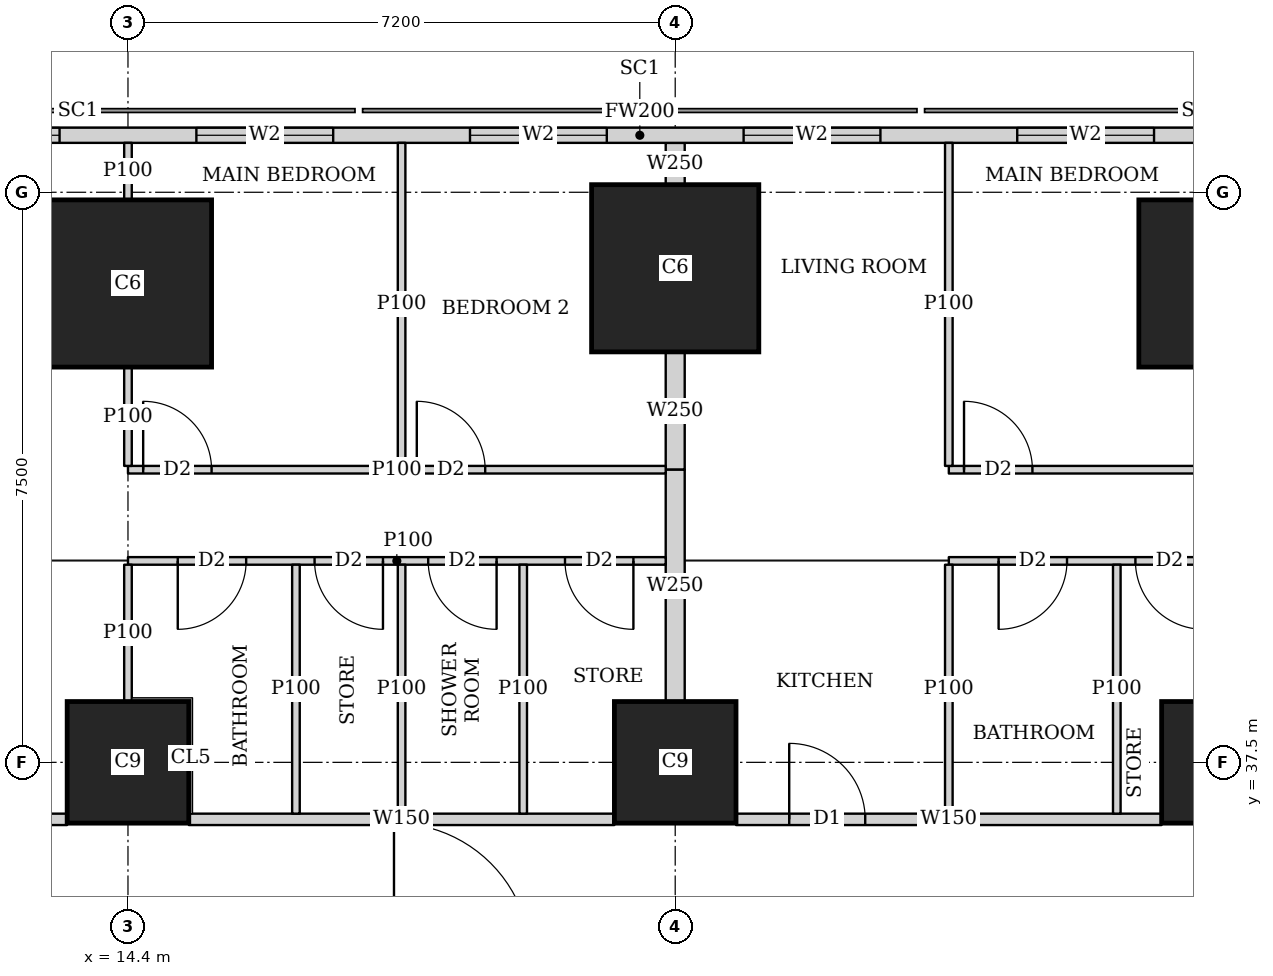
"""IFC4 building model, lengths in metres.
Left out: names, types, materials, properties, quantities, classifications, styles, units other than length and angle.
Written with IfcOpenShell. Run it as: python <this file> out.ifc"""

import sys

from ifc_helpers import new_model, si_unit, direction, frame, frame_2d, origin, origin_2d, place, context, subcontext, project, spatial, rectangle, extrude, element, fill, save


model = new_model("IFC4")
c1 = context("Model", 3, precision=1e-05, world=origin(), true_north=direction((0.0, 1.0)))
c2 = subcontext(c1, "Body", "Model", "MODEL_VIEW")
j1 = project(units=[si_unit("LENGTHUNIT", "METRE"), si_unit("PLANEANGLEUNIT", "RADIAN")], contexts=[c1])
p1 = place(None, origin())
s1 = spatial("IfcSite", under=j1, at=p1, CompositionType="ELEMENT")
p2 = place(p1, origin())
s2 = spatial("IfcBuilding", under=s1, at=p2, CompositionType="ELEMENT")
p3 = place(p2, frame((0.0, 0.0, 100.4)))
s3 = spatial("IfcBuildingStorey", under=s2, at=p3, CompositionType="ELEMENT", Elevation=100.4)
for number, where, z_axis, x_axis in (
    (1, (14.4, 37.5, 0.0), (0.0, 0.0, 1.0), (1.0, 0.0, 0.0)),
    (2, (21.6, 37.5, 0.0), (0.0, 0.0, 1.0), (1.0, 0.0, 0.0)),
    (3, (28.8, 37.5, 0.0), (0.0, 0.0, 1.0), (1.0, 0.0, 0.0)),
):
    element("IfcColumn", number, at=place(p3, frame(where, z_axis=z_axis, x_axis=x_axis)), inside=s3, PredefinedType="COLUMN", context=c2, shape_type="SweptSolid", body=[
        extrude(rectangle(XDim=1.6, YDim=1.6, at=origin_2d()), origin(), (0.0, 0.0, 1.0), 3.75),
    ])
for number, where, z_axis, x_axis in (
    (4, (14.4, 43.8, 0.0), (0.0, 0.0, 1.0), (1.0, 0.0, 0.0)),
    (5, (21.6, 44.0, 0.0), (0.0, 0.0, 1.0), (1.0, 0.0, 0.0)),
    (6, (28.8, 43.8, 0.0), (0.0, 0.0, 1.0), (1.0, 0.0, 0.0)),
):
    element("IfcColumn", number, at=place(p3, frame(where, z_axis=z_axis, x_axis=x_axis)), inside=s3, PredefinedType="COLUMN", context=c2, shape_type="SweptSolid", body=[
        extrude(rectangle(XDim=2.2, YDim=2.2, at=origin_2d()), origin(), (0.0, 0.0, 1.0), 3.75),
    ])
p4 = place(p3, frame((40.106, 45.75, 0.0), z_axis=(0.0, 0.0, 1.0), x_axis=(-1.0, 0.0, 0.0)))
e7 = element("IfcWall", 7, at=p4, inside=s3, PredefinedType="SOLIDWALL", context=c2, shape_type="SweptSolid", body=[
    extrude(rectangle(XDim=37.943, YDim=0.2, at=frame_2d((18.971, 0.0))), origin(), (0.0, 0.0, 1.0), 3.5),
])
p5 = place(p4, frame((8.606, 0.0, 0.9)))
e8 = element("IfcOpeningElement", 8, at=p5, cuts=e7, PredefinedType="OPENING", context=c2, shape_type="SweptSolid", body=[
    extrude(rectangle(XDim=1.8, YDim=1.5, at=frame_2d((0.9, 0.75))), frame((0.0, 0.11, 0.0), z_axis=(0.0, -1.0, 0.0), x_axis=(1.0, 0.0, 0.0)), (0.0, 0.0, 1.0), 0.22),
])
p6 = place(p4, frame((12.206, 0.0, 0.9)))
e9 = element("IfcOpeningElement", 9, at=p6, cuts=e7, PredefinedType="OPENING", context=c2, shape_type="SweptSolid", body=[
    extrude(rectangle(XDim=1.8, YDim=1.5, at=frame_2d((0.9, 0.75))), frame((0.0, 0.11, 0.0), z_axis=(0.0, -1.0, 0.0), x_axis=(1.0, 0.0, 0.0)), (0.0, 0.0, 1.0), 0.22),
])
p7 = place(p4, frame((15.806, 0.0, 0.9)))
e10 = element("IfcOpeningElement", 10, at=p7, cuts=e7, PredefinedType="OPENING", context=c2, shape_type="SweptSolid", body=[
    extrude(rectangle(XDim=1.8, YDim=1.5, at=frame_2d((0.9, 0.75))), frame((0.0, 0.11, 0.0), z_axis=(0.0, -1.0, 0.0), x_axis=(1.0, 0.0, 0.0)), (0.0, 0.0, 1.0), 0.22),
])
p8 = place(p4, frame((19.406, 0.0, 0.9)))
e11 = element("IfcOpeningElement", 11, at=p8, cuts=e7, PredefinedType="OPENING", context=c2, shape_type="SweptSolid", body=[
    extrude(rectangle(XDim=1.8, YDim=1.5, at=frame_2d((0.9, 0.75))), frame((0.0, 0.11, 0.0), z_axis=(0.0, -1.0, 0.0), x_axis=(1.0, 0.0, 0.0)), (0.0, 0.0, 1.0), 0.22),
])
p9 = place(p4, frame((23.006, 0.0, 0.9)))
e12 = element("IfcOpeningElement", 12, at=p9, cuts=e7, PredefinedType="OPENING", context=c2, shape_type="SweptSolid", body=[
    extrude(rectangle(XDim=1.8, YDim=1.5, at=frame_2d((0.9, 0.75))), frame((0.0, 0.11, 0.0), z_axis=(0.0, -1.0, 0.0), x_axis=(1.0, 0.0, 0.0)), (0.0, 0.0, 1.0), 0.22),
])
p10 = place(p4, frame((26.606, 0.0, 0.9)))
e13 = element("IfcOpeningElement", 13, at=p10, cuts=e7, PredefinedType="OPENING", context=c2, shape_type="SweptSolid", body=[
    extrude(rectangle(XDim=1.8, YDim=1.5, at=frame_2d((0.9, 0.75))), frame((0.0, 0.11, 0.0), z_axis=(0.0, -1.0, 0.0), x_axis=(1.0, 0.0, 0.0)), (0.0, 0.0, 1.0), 0.22),
])
p11 = place(p3, frame((8.1, 36.75, 0.0), z_axis=(0.0, 0.0, 1.0), x_axis=(1.0, 0.0, 0.0)))
e14 = element("IfcWall", 14, at=p11, inside=s3, PredefinedType="SOLIDWALL", context=c2, shape_type="SweptSolid", body=[
    extrude(rectangle(XDim=5.499, YDim=0.15, at=frame_2d((2.75, 0.0))), origin(), (0.0, 0.0, 1.0), 3.5),
])
p12 = place(p11, frame((2.725, 0.0, 0.0)))
e15 = element("IfcOpeningElement", 15, at=p12, cuts=e14, PredefinedType="OPENING", context=c2, shape_type="SweptSolid", body=[
    extrude(rectangle(XDim=1.0, YDim=2.1, at=frame_2d((0.5, 1.05))), frame((0.0, 0.085, 0.0), z_axis=(0.0, -1.0, 0.0), x_axis=(1.0, 0.0, 0.0)), (0.0, 0.0, 1.0), 0.17),
])
p13 = place(p3, frame((15.201, 36.75, 0.0), z_axis=(0.0, 0.0, 1.0), x_axis=(1.0, 0.0, 0.0)))
e16 = element("IfcWall", 16, at=p13, inside=s3, PredefinedType="SOLIDWALL", context=c2, shape_type="SweptSolid", body=[
    extrude(rectangle(XDim=5.598, YDim=0.15, at=frame_2d((2.799, 0.0))), origin(), (0.0, 0.0, 1.0), 3.5),
])
p14 = place(p3, frame((22.401, 36.75, 0.0), z_axis=(0.0, 0.0, 1.0), x_axis=(1.0, 0.0, 0.0)))
e17 = element("IfcWall", 17, at=p14, inside=s3, PredefinedType="SOLIDWALL", context=c2, shape_type="SweptSolid", body=[
    extrude(rectangle(XDim=5.598, YDim=0.15, at=frame_2d((2.799, 0.0))), origin(), (0.0, 0.0, 1.0), 3.5),
])
p15 = place(p14, frame((0.699, 0.0, 0.0)))
e18 = element("IfcOpeningElement", 18, at=p15, cuts=e17, PredefinedType="OPENING", context=c2, shape_type="SweptSolid", body=[
    extrude(rectangle(XDim=1.0, YDim=2.1, at=frame_2d((0.5, 1.05))), frame((0.0, 0.085, 0.0), z_axis=(0.0, -1.0, 0.0), x_axis=(1.0, 0.0, 0.0)), (0.0, 0.0, 1.0), 0.17),
])
p16 = place(p3, frame((14.4, 41.35, 0.0), z_axis=(0.0, 0.0, 1.0), x_axis=(1.0, 0.0, 0.0)))
e19 = element("IfcWall", 19, at=p16, inside=s3, PredefinedType="PARTITIONING", context=c2, shape_type="SweptSolid", body=[
    extrude(rectangle(XDim=7.075, YDim=0.1, at=frame_2d((3.538, 0.0))), origin(), (0.0, 0.0, 1.0), 3.5),
])
p17 = place(p16, frame((0.2, 0.0, 0.0)))
e20 = element("IfcOpeningElement", 20, at=p17, cuts=e19, PredefinedType="OPENING", context=c2, shape_type="SweptSolid", body=[
    extrude(rectangle(XDim=0.9, YDim=2.1, at=frame_2d((0.45, 1.05))), frame((0.0, 0.06, 0.0), z_axis=(0.0, -1.0, 0.0), x_axis=(1.0, 0.0, 0.0)), (0.0, 0.0, 1.0), 0.12),
])
p18 = place(p16, frame((3.8, 0.0, 0.0)))
e21 = element("IfcOpeningElement", 21, at=p18, cuts=e19, PredefinedType="OPENING", context=c2, shape_type="SweptSolid", body=[
    extrude(rectangle(XDim=0.9, YDim=2.1, at=frame_2d((0.45, 1.05))), frame((0.0, 0.06, 0.0), z_axis=(0.0, -1.0, 0.0), x_axis=(1.0, 0.0, 0.0)), (0.0, 0.0, 1.0), 0.12),
])
p19 = place(p3, frame((14.4, 40.15, 0.0), z_axis=(0.0, 0.0, 1.0), x_axis=(1.0, 0.0, 0.0)))
e22 = element("IfcWall", 22, at=p19, inside=s3, PredefinedType="PARTITIONING", context=c2, shape_type="SweptSolid", body=[
    extrude(rectangle(XDim=7.075, YDim=0.1, at=frame_2d((3.538, 0.0))), origin(), (0.0, 0.0, 1.0), 3.5),
])
p20 = place(p19, frame((0.655, 0.0, 0.0)))
e23 = element("IfcOpeningElement", 23, at=p20, cuts=e22, PredefinedType="OPENING", context=c2, shape_type="SweptSolid", body=[
    extrude(rectangle(XDim=0.9, YDim=2.1, at=frame_2d((0.45, 1.05))), frame((0.0, 0.06, 0.0), z_axis=(0.0, -1.0, 0.0), x_axis=(1.0, 0.0, 0.0)), (0.0, 0.0, 1.0), 0.12),
])
p21 = place(p19, frame((3.95, 0.0, 0.0)))
e24 = element("IfcOpeningElement", 24, at=p21, cuts=e22, PredefinedType="OPENING", context=c2, shape_type="SweptSolid", body=[
    extrude(rectangle(XDim=0.9, YDim=2.1, at=frame_2d((0.45, 1.05))), frame((0.0, 0.06, 0.0), z_axis=(0.0, -1.0, 0.0), x_axis=(1.0, 0.0, 0.0)), (0.0, 0.0, 1.0), 0.12),
])
p22 = place(p19, frame((2.455, 0.0, 0.0)))
e25 = element("IfcOpeningElement", 25, at=p22, cuts=e22, PredefinedType="OPENING", context=c2, shape_type="SweptSolid", body=[
    extrude(rectangle(XDim=0.9, YDim=2.1, at=frame_2d((0.45, 1.05))), frame((0.0, 0.06, 0.0), z_axis=(0.0, -1.0, 0.0), x_axis=(1.0, 0.0, 0.0)), (0.0, 0.0, 1.0), 0.12),
])
p23 = place(p19, frame((5.75, 0.0, 0.0)))
e26 = element("IfcOpeningElement", 26, at=p23, cuts=e22, PredefinedType="OPENING", context=c2, shape_type="SweptSolid", body=[
    extrude(rectangle(XDim=0.9, YDim=2.1, at=frame_2d((0.45, 1.05))), frame((0.0, 0.06, 0.0), z_axis=(0.0, -1.0, 0.0), x_axis=(1.0, 0.0, 0.0)), (0.0, 0.0, 1.0), 0.12),
])
p24 = place(p3, frame((14.4, 41.4, 0.0), z_axis=(0.0, 0.0, 1.0), x_axis=(0.0, 1.0, 0.0)))
e27 = element("IfcWall", 27, at=p24, inside=s3, PredefinedType="PARTITIONING", context=c2, shape_type="SweptSolid", body=[
    extrude(rectangle(XDim=1.299, YDim=0.1, at=frame_2d((0.649, 0.0))), origin(), (0.0, 0.0, 1.0), 3.5),
])
p25 = place(p3, frame((14.4, 44.901, 0.0), z_axis=(0.0, 0.0, 1.0), x_axis=(0.0, 1.0, 0.0)))
e28 = element("IfcWall", 28, at=p25, inside=s3, PredefinedType="PARTITIONING", context=c2, shape_type="SweptSolid", body=[
    extrude(rectangle(XDim=0.749, YDim=0.1, at=frame_2d((0.375, 0.0))), origin(), (0.0, 0.0, 1.0), 3.5),
])
p26 = place(p3, frame((18.0, 41.4, 0.0), z_axis=(0.0, 0.0, 1.0), x_axis=(0.0, 1.0, 0.0)))
e29 = element("IfcWall", 29, at=p26, inside=s3, PredefinedType="PARTITIONING", context=c2, shape_type="SweptSolid", body=[
    extrude(rectangle(XDim=4.25, YDim=0.1, at=frame_2d((2.125, 0.0))), origin(), (0.0, 0.0, 1.0), 2.2),
])
p27 = place(p3, frame((14.4, 38.301, 0.0), z_axis=(0.0, 0.0, 1.0), x_axis=(0.0, 1.0, 0.0)))
e30 = element("IfcWall", 30, at=p27, inside=s3, PredefinedType="PARTITIONING", context=c2, shape_type="SweptSolid", body=[
    extrude(rectangle(XDim=1.799, YDim=0.1, at=frame_2d((0.899, 0.0))), origin(), (0.0, 0.0, 1.0), 3.5),
])
for number, where, z_axis, x_axis in (
    (31, (18.0, 36.825, 0.0), (0.0, 0.0, 1.0), (0.0, 1.0, 0.0)),
    (32, (16.61, 36.825, 0.0), (0.0, 0.0, 1.0), (0.0, 1.0, 0.0)),
    (33, (19.6, 36.825, 0.0), (0.0, 0.0, 1.0), (0.0, 1.0, 0.0)),
):
    element("IfcWall", number, at=place(p3, frame(where, z_axis=z_axis, x_axis=x_axis)), inside=s3, PredefinedType="PARTITIONING", context=c2, shape_type="SweptSolid", body=[
        extrude(rectangle(XDim=3.275, YDim=0.1, at=frame_2d((1.638, 0.0))), origin(), (0.0, 0.0, 1.0), 3.5),
    ])
p28 = place(p3, frame((25.2, 41.35, 0.0), z_axis=(0.0, 0.0, 1.0), x_axis=(1.0, 0.0, 0.0)))
e34 = element("IfcWall", 34, at=p28, inside=s3, PredefinedType="PARTITIONING", context=c2, shape_type="SweptSolid", body=[
    extrude(rectangle(XDim=8.908, YDim=0.1, at=frame_2d((4.454, 0.0))), origin(), (0.0, 0.0, 1.0), 3.5),
])
p29 = place(p28, frame((0.2, 0.0, 0.0)))
e35 = element("IfcOpeningElement", 35, at=p29, cuts=e34, PredefinedType="OPENING", context=c2, shape_type="SweptSolid", body=[
    extrude(rectangle(XDim=0.9, YDim=2.1, at=frame_2d((0.45, 1.05))), frame((0.0, 0.06, 0.0), z_axis=(0.0, -1.0, 0.0), x_axis=(1.0, 0.0, 0.0)), (0.0, 0.0, 1.0), 0.12),
])
p30 = place(p28, frame((3.8, 0.0, 0.0)))
e36 = element("IfcOpeningElement", 36, at=p30, cuts=e34, PredefinedType="OPENING", context=c2, shape_type="SweptSolid", body=[
    extrude(rectangle(XDim=0.9, YDim=2.1, at=frame_2d((0.45, 1.05))), frame((0.0, 0.06, 0.0), z_axis=(0.0, -1.0, 0.0), x_axis=(1.0, 0.0, 0.0)), (0.0, 0.0, 1.0), 0.12),
])
p31 = place(p3, frame((25.2, 40.15, 0.0), z_axis=(0.0, 0.0, 1.0), x_axis=(1.0, 0.0, 0.0)))
e37 = element("IfcWall", 37, at=p31, inside=s3, PredefinedType="PARTITIONING", context=c2, shape_type="SweptSolid", body=[
    extrude(rectangle(XDim=9.135, YDim=0.1, at=frame_2d((4.567, 0.0))), origin(), (0.0, 0.0, 1.0), 3.5),
])
p32 = place(p31, frame((0.655, 0.0, 0.0)))
e38 = element("IfcOpeningElement", 38, at=p32, cuts=e37, PredefinedType="OPENING", context=c2, shape_type="SweptSolid", body=[
    extrude(rectangle(XDim=0.9, YDim=2.1, at=frame_2d((0.45, 1.05))), frame((0.0, 0.06, 0.0), z_axis=(0.0, -1.0, 0.0), x_axis=(1.0, 0.0, 0.0)), (0.0, 0.0, 1.0), 0.12),
])
p33 = place(p31, frame((3.95, 0.0, 0.0)))
e39 = element("IfcOpeningElement", 39, at=p33, cuts=e37, PredefinedType="OPENING", context=c2, shape_type="SweptSolid", body=[
    extrude(rectangle(XDim=0.9, YDim=2.1, at=frame_2d((0.45, 1.05))), frame((0.0, 0.06, 0.0), z_axis=(0.0, -1.0, 0.0), x_axis=(1.0, 0.0, 0.0)), (0.0, 0.0, 1.0), 0.12),
])
p34 = place(p31, frame((8.081, 0.0, 0.0)))
e40 = element("IfcOpeningElement", 40, at=p34, cuts=e37, PredefinedType="OPENING", context=c2, shape_type="SweptSolid", body=[
    extrude(rectangle(XDim=0.9, YDim=2.1, at=frame_2d((0.45, 1.05))), frame((0.0, 0.06, 0.0), z_axis=(0.0, -1.0, 0.0), x_axis=(1.0, 0.0, 0.0)), (0.0, 0.0, 1.0), 0.12),
])
p35 = place(p31, frame((2.455, 0.0, 0.0)))
e41 = element("IfcOpeningElement", 41, at=p35, cuts=e37, PredefinedType="OPENING", context=c2, shape_type="SweptSolid", body=[
    extrude(rectangle(XDim=0.9, YDim=2.1, at=frame_2d((0.45, 1.05))), frame((0.0, 0.06, 0.0), z_axis=(0.0, -1.0, 0.0), x_axis=(1.0, 0.0, 0.0)), (0.0, 0.0, 1.0), 0.12),
])
p36 = place(p31, frame((5.75, 0.0, 0.0)))
e42 = element("IfcOpeningElement", 42, at=p36, cuts=e37, PredefinedType="OPENING", context=c2, shape_type="SweptSolid", body=[
    extrude(rectangle(XDim=0.9, YDim=2.1, at=frame_2d((0.45, 1.05))), frame((0.0, 0.06, 0.0), z_axis=(0.0, -1.0, 0.0), x_axis=(1.0, 0.0, 0.0)), (0.0, 0.0, 1.0), 0.12),
])
p37 = place(p3, frame((25.2, 41.4, 0.0), z_axis=(0.0, 0.0, 1.0), x_axis=(0.0, 1.0, 0.0)))
e43 = element("IfcWall", 43, at=p37, inside=s3, PredefinedType="PARTITIONING", context=c2, shape_type="SweptSolid", body=[
    extrude(rectangle(XDim=4.25, YDim=0.1, at=frame_2d((2.125, 0.0))), origin(), (0.0, 0.0, 1.0), 2.2),
])
for number, where, z_axis, x_axis in (
    (44, (25.2, 36.825, 0.0), (0.0, 0.0, 1.0), (0.0, 1.0, 0.0)),
    (45, (27.41, 36.825, 0.0), (0.0, 0.0, 1.0), (0.0, 1.0, 0.0)),
):
    element("IfcWall", number, at=place(p3, frame(where, z_axis=z_axis, x_axis=x_axis)), inside=s3, PredefinedType="PARTITIONING", context=c2, shape_type="SweptSolid", body=[
        extrude(rectangle(XDim=3.275, YDim=0.1, at=frame_2d((1.638, 0.0))), origin(), (0.0, 0.0, 1.0), 3.5),
    ])
p38 = place(p3, frame((21.6, 41.35, 0.0), z_axis=(0.0, 0.0, 1.0), x_axis=(0.0, 1.0, 0.0)))
e46 = element("IfcWall", 46, at=p38, inside=s3, PredefinedType="SOLIDWALL", context=c2, shape_type="SweptSolid", body=[
    extrude(rectangle(XDim=1.549, YDim=0.25, at=frame_2d((0.774, 0.0))), origin(), (0.0, 0.0, 1.0), 3.5),
])
p39 = place(p3, frame((21.6, 45.101, 0.0), z_axis=(0.0, 0.0, 1.0), x_axis=(0.0, 1.0, 0.0)))
e47 = element("IfcWall", 47, at=p39, inside=s3, PredefinedType="SOLIDWALL", context=c2, shape_type="SweptSolid", body=[
    extrude(rectangle(XDim=0.549, YDim=0.25, at=frame_2d((0.274, 0.0))), origin(), (0.0, 0.0, 1.0), 3.5),
])
p40 = place(p3, frame((21.6, 38.301, 0.0), z_axis=(0.0, 0.0, 1.0), x_axis=(0.0, 1.0, 0.0)))
e48 = element("IfcWall", 48, at=p40, inside=s3, PredefinedType="SOLIDWALL", context=c2, shape_type="SweptSolid", body=[
    extrude(rectangle(XDim=3.049, YDim=0.25, at=frame_2d((1.524, 0.0))), origin(), (0.0, 0.0, 1.0), 3.5),
])
p41 = place(p6, origin())
e49 = element("IfcWindow", 49, at=p41, inside=s3, PartitioningType="SINGLE_PANEL", PredefinedType="WINDOW", context=c2, shape_type="SweptSolid", body=[
    extrude(rectangle(XDim=1.8, YDim=1.5, at=frame_2d((0.9, 0.75))), frame((0.0, 0.03, 0.0), z_axis=(0.0, -1.0, 0.0), x_axis=(1.0, 0.0, 0.0)), (0.0, 0.0, 1.0), 0.06),
])
fill(e9, e49)
p42 = place(p7, origin())
e50 = element("IfcWindow", 50, at=p42, inside=s3, PartitioningType="SINGLE_PANEL", PredefinedType="WINDOW", context=c2, shape_type="SweptSolid", body=[
    extrude(rectangle(XDim=1.8, YDim=1.5, at=frame_2d((0.9, 0.75))), frame((0.0, 0.03, 0.0), z_axis=(0.0, -1.0, 0.0), x_axis=(1.0, 0.0, 0.0)), (0.0, 0.0, 1.0), 0.06),
])
fill(e10, e50)
p43 = place(p8, origin())
e51 = element("IfcWindow", 51, at=p43, inside=s3, PartitioningType="SINGLE_PANEL", PredefinedType="WINDOW", context=c2, shape_type="SweptSolid", body=[
    extrude(rectangle(XDim=1.8, YDim=1.5, at=frame_2d((0.9, 0.75))), frame((0.0, 0.03, 0.0), z_axis=(0.0, -1.0, 0.0), x_axis=(1.0, 0.0, 0.0)), (0.0, 0.0, 1.0), 0.06),
])
fill(e11, e51)
p44 = place(p9, origin())
e52 = element("IfcWindow", 52, at=p44, inside=s3, PartitioningType="SINGLE_PANEL", PredefinedType="WINDOW", context=c2, shape_type="SweptSolid", body=[
    extrude(rectangle(XDim=1.8, YDim=1.5, at=frame_2d((0.9, 0.75))), frame((0.0, 0.03, 0.0), z_axis=(0.0, -1.0, 0.0), x_axis=(1.0, 0.0, 0.0)), (0.0, 0.0, 1.0), 0.06),
])
fill(e12, e52)
p45 = place(p10, origin())
e53 = element("IfcWindow", 53, at=p45, inside=s3, PartitioningType="SINGLE_PANEL", PredefinedType="WINDOW", context=c2, shape_type="SweptSolid", body=[
    extrude(rectangle(XDim=1.8, YDim=1.5, at=frame_2d((0.9, 0.75))), frame((0.0, 0.03, 0.0), z_axis=(0.0, -1.0, 0.0), x_axis=(1.0, 0.0, 0.0)), (0.0, 0.0, 1.0), 0.06),
])
fill(e13, e53)
p46 = place(p17, origin())
e54 = element("IfcDoor", 54, at=p46, inside=s3, OperationType="SINGLE_SWING_LEFT", PredefinedType="DOOR", context=c2, shape_type="SweptSolid", body=[
    extrude(rectangle(XDim=0.9, YDim=2.1, at=frame_2d((0.45, 1.05))), frame((0.0, 0.025, 0.0), z_axis=(0.0, -1.0, 0.0), x_axis=(1.0, 0.0, 0.0)), (0.0, 0.0, 1.0), 0.05),
])
fill(e20, e54)
p47 = place(p18, origin())
e55 = element("IfcDoor", 55, at=p47, inside=s3, OperationType="SINGLE_SWING_LEFT", PredefinedType="DOOR", context=c2, shape_type="SweptSolid", body=[
    extrude(rectangle(XDim=0.9, YDim=2.1, at=frame_2d((0.45, 1.05))), frame((0.0, 0.025, 0.0), z_axis=(0.0, -1.0, 0.0), x_axis=(1.0, 0.0, 0.0)), (0.0, 0.0, 1.0), 0.05),
])
fill(e21, e55)
p48 = place(p20, origin())
e56 = element("IfcDoor", 56, at=p48, inside=s3, OperationType="SINGLE_SWING_RIGHT", PredefinedType="DOOR", context=c2, shape_type="SweptSolid", body=[
    extrude(rectangle(XDim=0.9, YDim=2.1, at=frame_2d((0.45, 1.05))), frame((0.0, 0.025, 0.0), z_axis=(0.0, -1.0, 0.0), x_axis=(1.0, 0.0, 0.0)), (0.0, 0.0, 1.0), 0.05),
])
fill(e23, e56)
p49 = place(p21, origin())
e57 = element("IfcDoor", 57, at=p49, inside=s3, OperationType="SINGLE_SWING_LEFT", PredefinedType="DOOR", context=c2, shape_type="SweptSolid", body=[
    extrude(rectangle(XDim=0.9, YDim=2.1, at=frame_2d((0.45, 1.05))), frame((0.0, 0.025, 0.0), z_axis=(0.0, -1.0, 0.0), x_axis=(1.0, 0.0, 0.0)), (0.0, 0.0, 1.0), 0.05),
])
fill(e24, e57)
p50 = place(p22, origin())
e58 = element("IfcDoor", 58, at=p50, inside=s3, OperationType="SINGLE_SWING_LEFT", PredefinedType="DOOR", context=c2, shape_type="SweptSolid", body=[
    extrude(rectangle(XDim=0.9, YDim=2.1, at=frame_2d((0.45, 1.05))), frame((0.0, 0.025, 0.0), z_axis=(0.0, -1.0, 0.0), x_axis=(1.0, 0.0, 0.0)), (0.0, 0.0, 1.0), 0.05),
])
fill(e25, e58)
p51 = place(p23, origin())
e59 = element("IfcDoor", 59, at=p51, inside=s3, OperationType="SINGLE_SWING_LEFT", PredefinedType="DOOR", context=c2, shape_type="SweptSolid", body=[
    extrude(rectangle(XDim=0.9, YDim=2.1, at=frame_2d((0.45, 1.05))), frame((0.0, 0.025, 0.0), z_axis=(0.0, -1.0, 0.0), x_axis=(1.0, 0.0, 0.0)), (0.0, 0.0, 1.0), 0.05),
])
fill(e26, e59)
p52 = place(p29, origin())
e60 = element("IfcDoor", 60, at=p52, inside=s3, OperationType="SINGLE_SWING_LEFT", PredefinedType="DOOR", context=c2, shape_type="SweptSolid", body=[
    extrude(rectangle(XDim=0.9, YDim=2.1, at=frame_2d((0.45, 1.05))), frame((0.0, 0.025, 0.0), z_axis=(0.0, -1.0, 0.0), x_axis=(1.0, 0.0, 0.0)), (0.0, 0.0, 1.0), 0.05),
])
fill(e35, e60)
p53 = place(p32, origin())
e61 = element("IfcDoor", 61, at=p53, inside=s3, OperationType="SINGLE_SWING_RIGHT", PredefinedType="DOOR", context=c2, shape_type="SweptSolid", body=[
    extrude(rectangle(XDim=0.9, YDim=2.1, at=frame_2d((0.45, 1.05))), frame((0.0, 0.025, 0.0), z_axis=(0.0, -1.0, 0.0), x_axis=(1.0, 0.0, 0.0)), (0.0, 0.0, 1.0), 0.05),
])
fill(e38, e61)
p54 = place(p35, origin())
e62 = element("IfcDoor", 62, at=p54, inside=s3, OperationType="SINGLE_SWING_LEFT", PredefinedType="DOOR", context=c2, shape_type="SweptSolid", body=[
    extrude(rectangle(XDim=0.9, YDim=2.1, at=frame_2d((0.45, 1.05))), frame((0.0, 0.025, 0.0), z_axis=(0.0, -1.0, 0.0), x_axis=(1.0, 0.0, 0.0)), (0.0, 0.0, 1.0), 0.05),
])
fill(e41, e62)
p55 = place(p15, origin())
e63 = element("IfcDoor", 63, at=p55, inside=s3, OperationType="SINGLE_SWING_LEFT", PredefinedType="DOOR", context=c2, shape_type="SweptSolid", body=[
    extrude(rectangle(XDim=1.0, YDim=2.1, at=frame_2d((0.5, 1.05))), frame((0.0, 0.025, 0.0), z_axis=(0.0, -1.0, 0.0), x_axis=(1.0, 0.0, 0.0)), (0.0, 0.0, 1.0), 0.05),
])
fill(e18, e63)
save(model, sys.argv[1])
